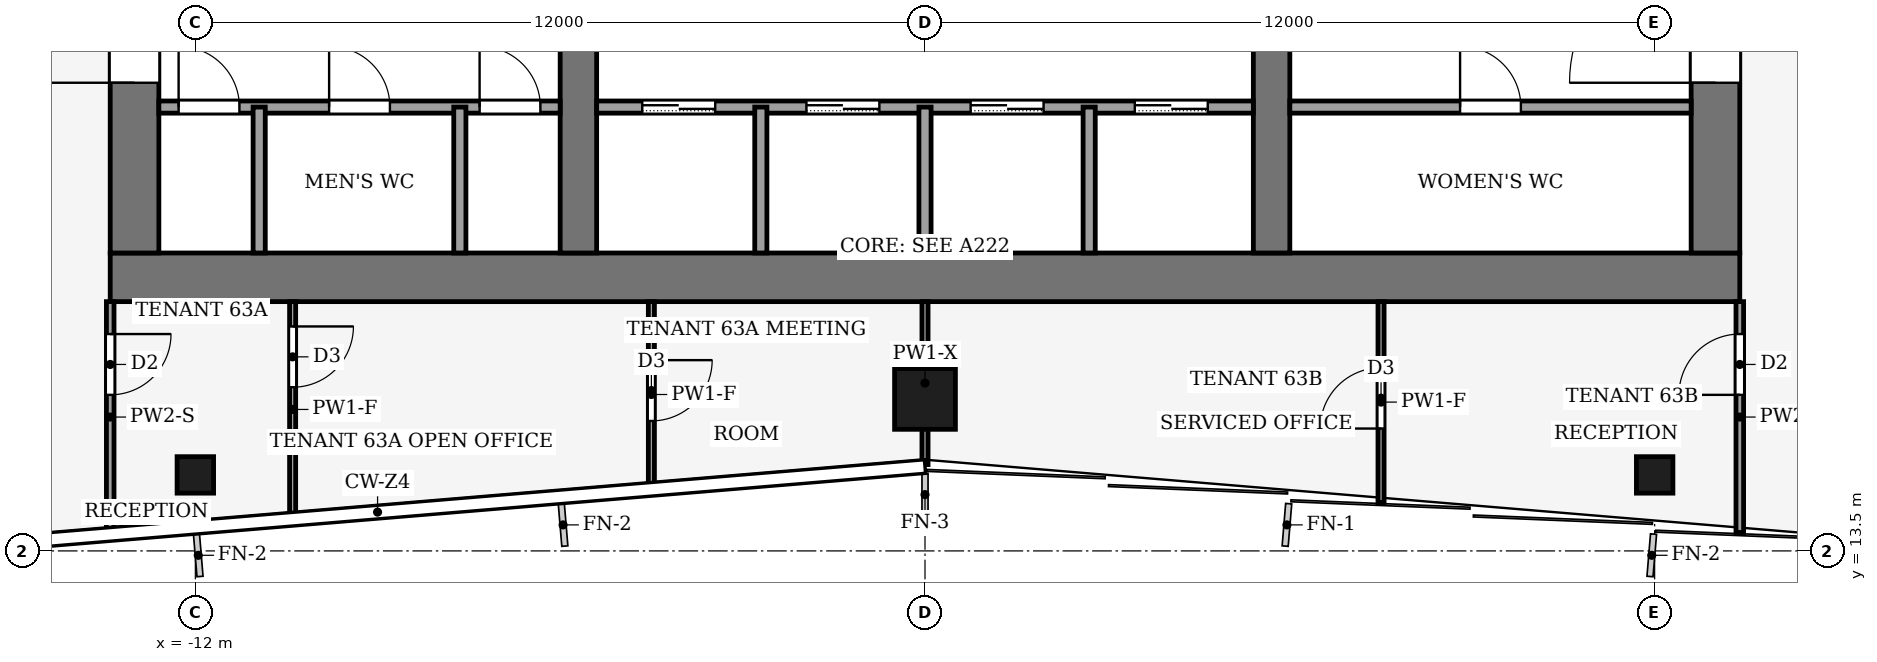
"""IFC4 building model, lengths in metres.
Left out: names, types, materials, properties, quantities, classifications, styles, units other than length and angle.
Written with IfcOpenShell. Run it as: python <this file> out.ifc"""

import sys

from ifc_helpers import new_model, si_unit, direction, frame, frame_2d, origin, origin_2d, place, context, subcontext, project, spatial, rectangle, hollow_rectangle, extrude, element, fill, save


model = new_model("IFC4")
c1 = context("Model", 3, precision=1e-05, world=origin(), true_north=direction((0.0, 1.0)))
c2 = subcontext(c1, "Body", "Model", "MODEL_VIEW")
j1 = project(units=[si_unit("LENGTHUNIT", "METRE"), si_unit("PLANEANGLEUNIT", "RADIAN")], contexts=[c1])
p1 = place(None, origin())
s1 = spatial("IfcSite", under=j1, at=p1, CompositionType="ELEMENT")
p2 = place(p1, origin())
s2 = spatial("IfcBuilding", under=s1, at=p2, CompositionType="ELEMENT")
p3 = place(p2, frame((0.0, 0.0, 274.0)))
s3 = spatial("IfcBuildingStorey", under=s2, at=p3, CompositionType="ELEMENT", Elevation=274.0)
p4 = place(p3, frame((-13.4, 18.0, -0.13), z_axis=(0.0, 0.0, 1.0), x_axis=(1.0, 0.0, 0.0)))
e1 = element("IfcWall", 1, at=p4, inside=s3, PredefinedType="SHEAR", context=c2, shape_type="SweptSolid", body=[
    extrude(rectangle(XDim=26.8, YDim=0.8, at=frame_2d((13.4, 0.0))), origin(), (0.0, 0.0, 1.0), 4.0),
])
p5 = place(p3, frame((-13.0, 18.4, -0.13), z_axis=(0.0, 0.0, 1.0), x_axis=(0.0, 1.0, 0.0)))
e2 = element("IfcWall", 2, at=p5, inside=s3, PredefinedType="SHEAR", context=c2, shape_type="SweptSolid", body=[
    extrude(rectangle(XDim=19.2, YDim=0.8, at=frame_2d((9.6, 0.0))), origin(), (0.0, 0.0, 1.0), 4.0),
])
p6 = place(p5, frame((2.8, 0.0, 0.13)))
e3 = element("IfcOpeningElement", 3, at=p6, cuts=e2, PredefinedType="OPENING", context=c2, shape_type="SweptSolid", body=[
    extrude(rectangle(XDim=2.4, YDim=2.4, at=frame_2d((1.2, 1.2))), frame((0.0, 0.41, 0.0), z_axis=(0.0, -1.0, 0.0), x_axis=(1.0, 0.0, 0.0)), (0.0, 0.0, 1.0), 0.82),
])
p7 = place(p5, frame((13.4, 0.0, 0.13)))
e4 = element("IfcOpeningElement", 4, at=p7, cuts=e2, PredefinedType="OPENING", context=c2, shape_type="SweptSolid", body=[
    extrude(rectangle(XDim=1.4, YDim=2.2, at=frame_2d((0.7, 1.1))), frame((0.0, 0.41, 0.0), z_axis=(0.0, -1.0, 0.0), x_axis=(1.0, 0.0, 0.0)), (0.0, 0.0, 1.0), 0.82),
])
p8 = place(p3, frame((13.0, 18.4, -0.13), z_axis=(0.0, 0.0, 1.0), x_axis=(0.0, 1.0, 0.0)))
e5 = element("IfcWall", 5, at=p8, inside=s3, PredefinedType="SHEAR", context=c2, shape_type="SweptSolid", body=[
    extrude(rectangle(XDim=19.2, YDim=0.8, at=frame_2d((9.6, 0.0))), origin(), (0.0, 0.0, 1.0), 4.0),
])
p9 = place(p8, frame((2.8, 0.0, 0.13)))
e6 = element("IfcOpeningElement", 6, at=p9, cuts=e5, PredefinedType="OPENING", context=c2, shape_type="SweptSolid", body=[
    extrude(rectangle(XDim=2.4, YDim=2.4, at=frame_2d((1.2, 1.2))), frame((0.0, 0.41, 0.0), z_axis=(0.0, -1.0, 0.0), x_axis=(1.0, 0.0, 0.0)), (0.0, 0.0, 1.0), 0.82),
])
p10 = place(p8, frame((13.3, 0.0, 0.13)))
e7 = element("IfcOpeningElement", 7, at=p10, cuts=e5, PredefinedType="OPENING", context=c2, shape_type="SweptSolid", body=[
    extrude(rectangle(XDim=2.4, YDim=2.4, at=frame_2d((1.2, 1.2))), frame((0.0, 0.41, 0.0), z_axis=(0.0, -1.0, 0.0), x_axis=(1.0, 0.0, 0.0)), (0.0, 0.0, 1.0), 0.82),
])
p11 = place(p3, frame((-5.7, 18.4, -0.13), z_axis=(0.0, 0.0, 1.0), x_axis=(0.0, 1.0, 0.0)))
e8 = element("IfcWall", 8, at=p11, inside=s3, PredefinedType="SHEAR", context=c2, shape_type="SweptSolid", body=[
    extrude(rectangle(XDim=19.2, YDim=0.6, at=frame_2d((9.6, 0.0))), origin(), (0.0, 0.0, 1.0), 4.0),
])
p12 = place(p11, frame((8.35, 0.0, 0.13)))
e9 = element("IfcOpeningElement", 9, at=p12, cuts=e8, PredefinedType="OPENING", context=c2, shape_type="SweptSolid", body=[
    extrude(rectangle(XDim=0.9, YDim=2.1, at=frame_2d((0.45, 1.05))), frame((0.0, 0.31, 0.0), z_axis=(0.0, -1.0, 0.0), x_axis=(1.0, 0.0, 0.0)), (0.0, 0.0, 1.0), 0.62),
])
p13 = place(p3, frame((5.7, 18.4, -0.13), z_axis=(0.0, 0.0, 1.0), x_axis=(0.0, 1.0, 0.0)))
e10 = element("IfcWall", 10, at=p13, inside=s3, PredefinedType="SHEAR", context=c2, shape_type="SweptSolid", body=[
    extrude(rectangle(XDim=19.2, YDim=0.6, at=frame_2d((9.6, 0.0))), origin(), (0.0, 0.0, 1.0), 4.0),
])
p14 = place(p13, frame((8.35, 0.0, 0.13)))
e11 = element("IfcOpeningElement", 11, at=p14, cuts=e10, PredefinedType="OPENING", context=c2, shape_type="SweptSolid", body=[
    extrude(rectangle(XDim=0.9, YDim=2.1, at=frame_2d((0.45, 1.05))), frame((0.0, 0.31, 0.0), z_axis=(0.0, -1.0, 0.0), x_axis=(1.0, 0.0, 0.0)), (0.0, 0.0, 1.0), 0.62),
])
p15 = place(p13, frame((13.3, 0.0, 0.13)))
e12 = element("IfcOpeningElement", 12, at=p15, cuts=e10, PredefinedType="OPENING", context=c2, shape_type="SweptSolid", body=[
    extrude(rectangle(XDim=2.4, YDim=2.4, at=frame_2d((1.2, 1.2))), frame((0.0, 0.31, 0.0), z_axis=(0.0, -1.0, 0.0), x_axis=(1.0, 0.0, 0.0)), (0.0, 0.0, 1.0), 0.62),
])
p16 = place(p3, frame((0.0, 16.0, 0.0), z_axis=(0.0, 0.0, 1.0), x_axis=(1.0, 0.0, 0.0)))
e13 = element("IfcColumn", 13, at=p16, inside=s3, PredefinedType="COLUMN", context=c2, shape_type="SweptSolid", body=[
    extrude(hollow_rectangle(XDim=1.0, YDim=1.0, WallThickness=0.045, at=origin_2d()), origin(), (0.0, 0.0, 1.0), 4.0),
])
for number, where, z_axis, x_axis in (
    (14, (-12.0, 14.75, 0.0), (0.0, 0.0, 1.0), (1.0, 0.0, 0.0)),
    (15, (12.0, 14.75, 0.0), (0.0, 0.0, 1.0), (1.0, 0.0, 0.0)),
):
    element("IfcColumn", number, at=place(p3, frame(where, z_axis=z_axis, x_axis=x_axis)), inside=s3, PredefinedType="COLUMN", context=c2, shape_type="SweptSolid", body=[
        extrude(hollow_rectangle(XDim=0.6, YDim=0.6, WallThickness=0.025, at=origin_2d()), origin(), (0.0, 0.0, 1.0), 4.0),
    ])
p17 = place(p3, frame((-12.6, 20.8, 0.0), z_axis=(0.0, 0.0, 1.0), x_axis=(1.0, 0.0, 0.0)))
e16 = element("IfcWall", 16, at=p17, inside=s3, PredefinedType="PARTITIONING", context=c2, shape_type="SweptSolid", body=[
    extrude(rectangle(XDim=6.6, YDim=0.2, at=frame_2d((3.3, 0.0))), origin(), (0.0, 0.0, 1.0), 3.87),
])
p18 = place(p17, frame((0.325, 0.0, 0.0)))
e17 = element("IfcOpeningElement", 17, at=p18, cuts=e16, PredefinedType="OPENING", context=c2, shape_type="SweptSolid", body=[
    extrude(rectangle(XDim=1.0, YDim=2.1, at=frame_2d((0.5, 1.05))), frame((0.0, 0.11, 0.0), z_axis=(0.0, -1.0, 0.0), x_axis=(1.0, 0.0, 0.0)), (0.0, 0.0, 1.0), 0.22),
])
p19 = place(p17, frame((2.8, 0.0, 0.0)))
e18 = element("IfcOpeningElement", 18, at=p19, cuts=e16, PredefinedType="OPENING", context=c2, shape_type="SweptSolid", body=[
    extrude(rectangle(XDim=1.0, YDim=2.1, at=frame_2d((0.5, 1.05))), frame((0.0, 0.11, 0.0), z_axis=(0.0, -1.0, 0.0), x_axis=(1.0, 0.0, 0.0)), (0.0, 0.0, 1.0), 0.22),
])
p20 = place(p17, frame((5.275, 0.0, 0.0)))
e19 = element("IfcOpeningElement", 19, at=p20, cuts=e16, PredefinedType="OPENING", context=c2, shape_type="SweptSolid", body=[
    extrude(rectangle(XDim=1.0, YDim=2.1, at=frame_2d((0.5, 1.05))), frame((0.0, 0.11, 0.0), z_axis=(0.0, -1.0, 0.0), x_axis=(1.0, 0.0, 0.0)), (0.0, 0.0, 1.0), 0.22),
])
p21 = place(p3, frame((-5.4, 20.8, 0.0), z_axis=(0.0, 0.0, 1.0), x_axis=(1.0, 0.0, 0.0)))
e20 = element("IfcWall", 20, at=p21, inside=s3, PredefinedType="PARTITIONING", context=c2, shape_type="SweptSolid", body=[
    extrude(rectangle(XDim=10.8, YDim=0.2, at=frame_2d((5.4, 0.0))), origin(), (0.0, 0.0, 1.0), 3.87),
])
p22 = place(p21, frame((0.75, 0.0, 0.0)))
e21 = element("IfcOpeningElement", 21, at=p22, cuts=e20, PredefinedType="OPENING", context=c2, shape_type="SweptSolid", body=[
    extrude(rectangle(XDim=1.2, YDim=2.2, at=frame_2d((0.6, 1.1))), frame((0.0, 0.11, 0.0), z_axis=(0.0, -1.0, 0.0), x_axis=(1.0, 0.0, 0.0)), (0.0, 0.0, 1.0), 0.22),
])
p23 = place(p21, frame((3.45, 0.0, 0.0)))
e22 = element("IfcOpeningElement", 22, at=p23, cuts=e20, PredefinedType="OPENING", context=c2, shape_type="SweptSolid", body=[
    extrude(rectangle(XDim=1.2, YDim=2.2, at=frame_2d((0.6, 1.1))), frame((0.0, 0.11, 0.0), z_axis=(0.0, -1.0, 0.0), x_axis=(1.0, 0.0, 0.0)), (0.0, 0.0, 1.0), 0.22),
])
p24 = place(p21, frame((6.15, 0.0, 0.0)))
e23 = element("IfcOpeningElement", 23, at=p24, cuts=e20, PredefinedType="OPENING", context=c2, shape_type="SweptSolid", body=[
    extrude(rectangle(XDim=1.2, YDim=2.2, at=frame_2d((0.6, 1.1))), frame((0.0, 0.11, 0.0), z_axis=(0.0, -1.0, 0.0), x_axis=(1.0, 0.0, 0.0)), (0.0, 0.0, 1.0), 0.22),
])
p25 = place(p21, frame((8.85, 0.0, 0.0)))
e24 = element("IfcOpeningElement", 24, at=p25, cuts=e20, PredefinedType="OPENING", context=c2, shape_type="SweptSolid", body=[
    extrude(rectangle(XDim=1.2, YDim=2.2, at=frame_2d((0.6, 1.1))), frame((0.0, 0.11, 0.0), z_axis=(0.0, -1.0, 0.0), x_axis=(1.0, 0.0, 0.0)), (0.0, 0.0, 1.0), 0.22),
])
p26 = place(p3, frame((6.0, 20.8, 0.0), z_axis=(0.0, 0.0, 1.0), x_axis=(1.0, 0.0, 0.0)))
e25 = element("IfcWall", 25, at=p26, inside=s3, PredefinedType="PARTITIONING", context=c2, shape_type="SweptSolid", body=[
    extrude(rectangle(XDim=6.6, YDim=0.2, at=frame_2d((3.3, 0.0))), origin(), (0.0, 0.0, 1.0), 3.87),
])
p27 = place(p26, frame((2.8, 0.0, 0.0)))
e26 = element("IfcOpeningElement", 26, at=p27, cuts=e25, PredefinedType="OPENING", context=c2, shape_type="SweptSolid", body=[
    extrude(rectangle(XDim=1.0, YDim=2.1, at=frame_2d((0.5, 1.05))), frame((0.0, 0.11, 0.0), z_axis=(0.0, -1.0, 0.0), x_axis=(1.0, 0.0, 0.0)), (0.0, 0.0, 1.0), 0.22),
])
for number, where, z_axis, x_axis in (
    (27, (-10.95, 18.4, 0.0), (0.0, 0.0, 1.0), (0.0, 1.0, 0.0)),
    (28, (-7.65, 18.4, 0.0), (0.0, 0.0, 1.0), (0.0, 1.0, 0.0)),
    (29, (-2.7, 18.4, 0.0), (0.0, 0.0, 1.0), (0.0, 1.0, 0.0)),
    (30, (0.0, 18.4, 0.0), (0.0, 0.0, 1.0), (0.0, 1.0, 0.0)),
    (31, (2.7, 18.4, 0.0), (0.0, 0.0, 1.0), (0.0, 1.0, 0.0)),
):
    element("IfcWall", number, at=place(p3, frame(where, z_axis=z_axis, x_axis=x_axis)), inside=s3, PredefinedType="PARTITIONING", context=c2, shape_type="SweptSolid", body=[
        extrude(rectangle(XDim=2.4, YDim=0.2, at=frame_2d((1.2, 0.0))), origin(), (0.0, 0.0, 1.0), 3.87),
    ])
p28 = place(p3, frame((-13.4, 17.6, 0.0), z_axis=(0.0, 0.0, 1.0), x_axis=(0.0, -1.0, 0.0)))
e32 = element("IfcWall", 32, at=p28, inside=s3, PredefinedType="PARTITIONING", context=c2, shape_type="SweptSolid", body=[
    extrude(rectangle(XDim=3.797, YDim=0.125, at=frame_2d((1.898, 0.0))), origin(), (0.0, 0.0, 1.0), 3.04),
])
p29 = place(p28, frame((0.533, 0.0, 0.0)))
e33 = element("IfcOpeningElement", 33, at=p29, cuts=e32, PredefinedType="OPENING", context=c2, shape_type="SweptSolid", body=[
    extrude(rectangle(XDim=1.0, YDim=2.1, at=frame_2d((0.5, 1.05))), frame((0.0, 0.073, 0.0), z_axis=(0.0, -1.0, 0.0), x_axis=(1.0, 0.0, 0.0)), (0.0, 0.0, 1.0), 0.145),
])
p30 = place(p3, frame((13.4, 13.803, 0.0), z_axis=(0.0, 0.0, 1.0), x_axis=(0.0, 1.0, 0.0)))
e34 = element("IfcWall", 34, at=p30, inside=s3, PredefinedType="PARTITIONING", context=c2, shape_type="SweptSolid", body=[
    extrude(rectangle(XDim=3.797, YDim=0.125, at=frame_2d((1.898, 0.0))), origin(), (0.0, 0.0, 1.0), 3.04),
])
p31 = place(p30, frame((2.263, 0.0, 0.0)))
e35 = element("IfcOpeningElement", 35, at=p31, cuts=e34, PredefinedType="OPENING", context=c2, shape_type="SweptSolid", body=[
    extrude(rectangle(XDim=1.0, YDim=2.1, at=frame_2d((0.5, 1.05))), frame((0.0, 0.073, 0.0), z_axis=(0.0, -1.0, 0.0), x_axis=(1.0, 0.0, 0.0)), (0.0, 0.0, 1.0), 0.145),
])
p32 = place(p3, frame((-10.4, 17.6, 0.0), z_axis=(0.0, 0.0, 1.0), x_axis=(0.0, -1.0, 0.0)))
e36 = element("IfcWall", 36, at=p32, inside=s3, PredefinedType="PARTITIONING", context=c2, shape_type="SweptSolid", body=[
    extrude(rectangle(XDim=3.547, YDim=0.1, at=frame_2d((1.773, 0.0))), origin(), (0.0, 0.0, 1.0), 3.04),
])
p33 = place(p32, frame((0.408, 0.0, 0.0)))
e37 = element("IfcOpeningElement", 37, at=p33, cuts=e36, PredefinedType="OPENING", context=c2, shape_type="SweptSolid", body=[
    extrude(rectangle(XDim=1.0, YDim=2.1, at=frame_2d((0.5, 1.05))), frame((0.0, 0.06, 0.0), z_axis=(0.0, -1.0, 0.0), x_axis=(1.0, 0.0, 0.0)), (0.0, 0.0, 1.0), 0.12),
])
p34 = place(p3, frame((-4.5, 17.6, 0.0), z_axis=(0.0, 0.0, 1.0), x_axis=(0.0, -1.0, 0.0)))
e38 = element("IfcWall", 38, at=p34, inside=s3, PredefinedType="PARTITIONING", context=c2, shape_type="SweptSolid", body=[
    extrude(rectangle(XDim=3.055, YDim=0.1, at=frame_2d((1.528, 0.0))), origin(), (0.0, 0.0, 1.0), 3.04),
])
p35 = place(p34, frame((0.962, 0.0, 0.0)))
e39 = element("IfcOpeningElement", 39, at=p35, cuts=e38, PredefinedType="OPENING", context=c2, shape_type="SweptSolid", body=[
    extrude(rectangle(XDim=1.0, YDim=2.1, at=frame_2d((0.5, 1.05))), frame((0.0, 0.06, 0.0), z_axis=(0.0, -1.0, 0.0), x_axis=(1.0, 0.0, 0.0)), (0.0, 0.0, 1.0), 0.12),
])
p36 = place(p3, frame((0.0, 14.92, 0.0), z_axis=(0.0, 0.0, 1.0), x_axis=(0.0, 1.0, 0.0)))
e40 = element("IfcWall", 40, at=p36, inside=s3, PredefinedType="PARTITIONING", context=c2, shape_type="SweptSolid", body=[
    extrude(rectangle(XDim=2.68, YDim=0.1, at=frame_2d((1.34, 0.0))), origin(), (0.0, 0.0, 1.0), 3.54),
])
p37 = place(p3, frame((7.5, 14.295, 0.0), z_axis=(0.0, 0.0, 1.0), x_axis=(0.0, 1.0, 0.0)))
e41 = element("IfcWall", 41, at=p37, inside=s3, PredefinedType="PARTITIONING", context=c2, shape_type="SweptSolid", body=[
    extrude(rectangle(XDim=3.305, YDim=0.1, at=frame_2d((1.653, 0.0))), origin(), (0.0, 0.0, 1.0), 3.04),
])
p38 = place(p37, frame((1.218, 0.0, 0.0)))
e42 = element("IfcOpeningElement", 42, at=p38, cuts=e41, PredefinedType="OPENING", context=c2, shape_type="SweptSolid", body=[
    extrude(rectangle(XDim=1.0, YDim=2.1, at=frame_2d((0.5, 1.05))), frame((0.0, 0.06, 0.0), z_axis=(0.0, -1.0, 0.0), x_axis=(1.0, 0.0, 0.0)), (0.0, 0.0, 1.0), 0.12),
])
p39 = place(p22, origin())
e43 = element("IfcDoor", 43, at=p39, inside=s3, OperationType="SLIDING_TO_LEFT", PredefinedType="DOOR", context=c2, shape_type="SweptSolid", body=[
    extrude(rectangle(XDim=1.2, YDim=2.2, at=frame_2d((0.6, 1.1))), frame((0.0, 0.025, 0.0), z_axis=(0.0, -1.0, 0.0), x_axis=(1.0, 0.0, 0.0)), (0.0, 0.0, 1.0), 0.05),
])
fill(e21, e43)
p40 = place(p23, origin())
e44 = element("IfcDoor", 44, at=p40, inside=s3, OperationType="SLIDING_TO_LEFT", PredefinedType="DOOR", context=c2, shape_type="SweptSolid", body=[
    extrude(rectangle(XDim=1.2, YDim=2.2, at=frame_2d((0.6, 1.1))), frame((0.0, 0.025, 0.0), z_axis=(0.0, -1.0, 0.0), x_axis=(1.0, 0.0, 0.0)), (0.0, 0.0, 1.0), 0.05),
])
fill(e22, e44)
p41 = place(p24, origin())
e45 = element("IfcDoor", 45, at=p41, inside=s3, OperationType="SLIDING_TO_LEFT", PredefinedType="DOOR", context=c2, shape_type="SweptSolid", body=[
    extrude(rectangle(XDim=1.2, YDim=2.2, at=frame_2d((0.6, 1.1))), frame((0.0, 0.025, 0.0), z_axis=(0.0, -1.0, 0.0), x_axis=(1.0, 0.0, 0.0)), (0.0, 0.0, 1.0), 0.05),
])
fill(e23, e45)
p42 = place(p25, origin())
e46 = element("IfcDoor", 46, at=p42, inside=s3, OperationType="SLIDING_TO_LEFT", PredefinedType="DOOR", context=c2, shape_type="SweptSolid", body=[
    extrude(rectangle(XDim=1.2, YDim=2.2, at=frame_2d((0.6, 1.1))), frame((0.0, 0.025, 0.0), z_axis=(0.0, -1.0, 0.0), x_axis=(1.0, 0.0, 0.0)), (0.0, 0.0, 1.0), 0.05),
])
fill(e24, e46)
p43 = place(p18, origin())
e47 = element("IfcDoor", 47, at=p43, inside=s3, OperationType="SINGLE_SWING_RIGHT", PredefinedType="DOOR", context=c2, shape_type="SweptSolid", body=[
    extrude(rectangle(XDim=1.0, YDim=2.1, at=frame_2d((0.5, 1.05))), frame((0.0, 0.025, 0.0), z_axis=(0.0, -1.0, 0.0), x_axis=(1.0, 0.0, 0.0)), (0.0, 0.0, 1.0), 0.05),
])
fill(e17, e47)
p44 = place(p19, origin())
e48 = element("IfcDoor", 48, at=p44, inside=s3, OperationType="SINGLE_SWING_RIGHT", PredefinedType="DOOR", context=c2, shape_type="SweptSolid", body=[
    extrude(rectangle(XDim=1.0, YDim=2.1, at=frame_2d((0.5, 1.05))), frame((0.0, 0.025, 0.0), z_axis=(0.0, -1.0, 0.0), x_axis=(1.0, 0.0, 0.0)), (0.0, 0.0, 1.0), 0.05),
])
fill(e18, e48)
p45 = place(p20, origin())
e49 = element("IfcDoor", 49, at=p45, inside=s3, OperationType="SINGLE_SWING_RIGHT", PredefinedType="DOOR", context=c2, shape_type="SweptSolid", body=[
    extrude(rectangle(XDim=1.0, YDim=2.1, at=frame_2d((0.5, 1.05))), frame((0.0, 0.025, 0.0), z_axis=(0.0, -1.0, 0.0), x_axis=(1.0, 0.0, 0.0)), (0.0, 0.0, 1.0), 0.05),
])
fill(e19, e49)
p46 = place(p27, origin())
e50 = element("IfcDoor", 50, at=p46, inside=s3, OperationType="SINGLE_SWING_RIGHT", PredefinedType="DOOR", context=c2, shape_type="SweptSolid", body=[
    extrude(rectangle(XDim=1.0, YDim=2.1, at=frame_2d((0.5, 1.05))), frame((0.0, 0.025, 0.0), z_axis=(0.0, -1.0, 0.0), x_axis=(1.0, 0.0, 0.0)), (0.0, 0.0, 1.0), 0.05),
])
fill(e26, e50)
p47 = place(p6, origin())
e51 = element("IfcDoor", 51, at=p47, inside=s3, OperationType="DOUBLE_DOOR_SINGLE_SWING", PredefinedType="DOOR", context=c2, shape_type="SweptSolid", body=[
    extrude(rectangle(XDim=2.4, YDim=2.4, at=frame_2d((1.2, 1.2))), frame((0.0, 0.025, 0.0), z_axis=(0.0, -1.0, 0.0), x_axis=(1.0, 0.0, 0.0)), (0.0, 0.0, 1.0), 0.05),
])
fill(e3, e51)
p48 = place(p9, origin())
e52 = element("IfcDoor", 52, at=p48, inside=s3, OperationType="DOUBLE_DOOR_SINGLE_SWING", PredefinedType="DOOR", context=c2, shape_type="SweptSolid", body=[
    extrude(rectangle(XDim=2.4, YDim=2.4, at=frame_2d((1.2, 1.2))), frame((0.0, 0.025, 0.0), z_axis=(0.0, -1.0, 0.0), x_axis=(1.0, 0.0, 0.0)), (0.0, 0.0, 1.0), 0.05),
])
fill(e6, e52)
p49 = place(p29, origin())
e53 = element("IfcDoor", 53, at=p49, inside=s3, OperationType="SINGLE_SWING_LEFT", PredefinedType="DOOR", context=c2, shape_type="SweptSolid", body=[
    extrude(rectangle(XDim=1.0, YDim=2.1, at=frame_2d((0.5, 1.05))), frame((0.0, 0.025, 0.0), z_axis=(0.0, -1.0, 0.0), x_axis=(1.0, 0.0, 0.0)), (0.0, 0.0, 1.0), 0.05),
])
fill(e33, e53)
p50 = place(p31, origin())
e54 = element("IfcDoor", 54, at=p50, inside=s3, OperationType="SINGLE_SWING_RIGHT", PredefinedType="DOOR", context=c2, shape_type="SweptSolid", body=[
    extrude(rectangle(XDim=1.0, YDim=2.1, at=frame_2d((0.5, 1.05))), frame((0.0, 0.025, 0.0), z_axis=(0.0, -1.0, 0.0), x_axis=(1.0, 0.0, 0.0)), (0.0, 0.0, 1.0), 0.05),
])
fill(e35, e54)
p51 = place(p33, origin())
e55 = element("IfcDoor", 55, at=p51, inside=s3, OperationType="SINGLE_SWING_LEFT", PredefinedType="DOOR", context=c2, shape_type="SweptSolid", body=[
    extrude(rectangle(XDim=1.0, YDim=2.1, at=frame_2d((0.5, 1.05))), frame((0.0, 0.025, 0.0), z_axis=(0.0, -1.0, 0.0), x_axis=(1.0, 0.0, 0.0)), (0.0, 0.0, 1.0), 0.05),
])
fill(e37, e55)
p52 = place(p35, origin())
e56 = element("IfcDoor", 56, at=p52, inside=s3, OperationType="SINGLE_SWING_LEFT", PredefinedType="DOOR", context=c2, shape_type="SweptSolid", body=[
    extrude(rectangle(XDim=1.0, YDim=2.1, at=frame_2d((0.5, 1.05))), frame((0.0, 0.025, 0.0), z_axis=(0.0, -1.0, 0.0), x_axis=(1.0, 0.0, 0.0)), (0.0, 0.0, 1.0), 0.05),
])
fill(e39, e56)
p53 = place(p38, origin())
e57 = element("IfcDoor", 57, at=p53, inside=s3, OperationType="SINGLE_SWING_RIGHT", PredefinedType="DOOR", context=c2, shape_type="SweptSolid", body=[
    extrude(rectangle(XDim=1.0, YDim=2.1, at=frame_2d((0.5, 1.05))), frame((0.0, 0.025, 0.0), z_axis=(0.0, -1.0, 0.0), x_axis=(1.0, 0.0, 0.0)), (0.0, 0.0, 1.0), 0.05),
])
fill(e42, e57)
save(model, sys.argv[1])
